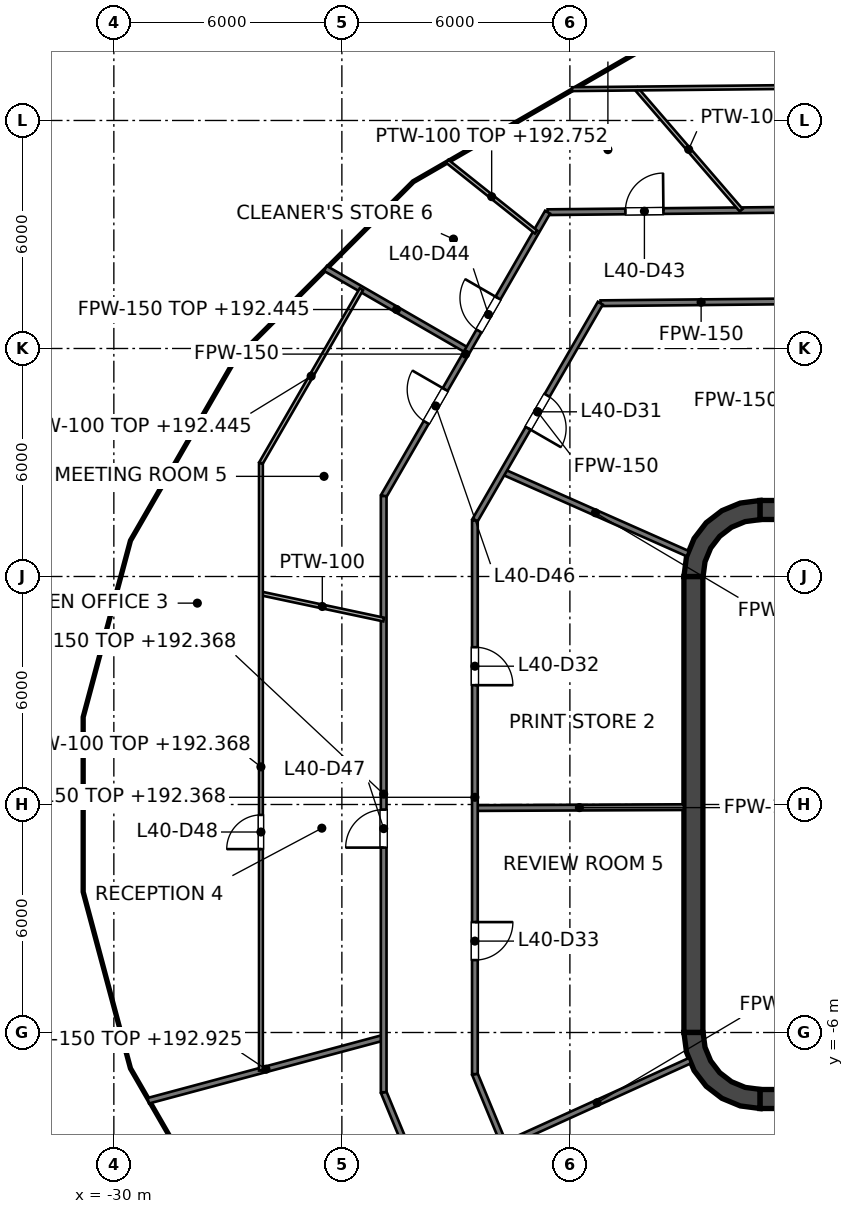
"""IFC4 building model, lengths in metres.
Left out: names, types, materials, properties, quantities, classifications, styles, units other than length and angle.
Written with IfcOpenShell. Run it as: python <this file> out.ifc"""

import sys

from ifc_helpers import new_model, si_unit, direction, frame, frame_2d, origin, place, context, subcontext, project, spatial, polyline, rectangle, outline, extrude, element, fill, save


model = new_model("IFC4")
c1 = context("Model", 3, precision=1e-05, world=origin(), true_north=direction((0.0, 1.0)))
c2 = subcontext(c1, "Body", "Model", "MODEL_VIEW")
j1 = project(units=[si_unit("LENGTHUNIT", "METRE"), si_unit("PLANEANGLEUNIT", "RADIAN")], contexts=[c1])
p1 = place(None, origin())
s1 = spatial("IfcSite", under=j1, at=p1, CompositionType="ELEMENT")
p2 = place(p1, origin())
s2 = spatial("IfcBuilding", under=s1, at=p2, CompositionType="ELEMENT")
p3 = place(p2, frame((0.0, 0.0, 189.6)))
s3 = spatial("IfcBuildingStorey", under=s2, at=p3, CompositionType="ELEMENT", Elevation=189.6)
p4 = place(p3, frame((-13.0, 7.75, 0.0), z_axis=(0.0, 0.0, 1.0), x_axis=(1.0, 0.0, 0.0)))
e1 = element("IfcWall", 1, at=p4, inside=s3, PredefinedType="SHEAR", context=c2, shape_type="SweptSolid", body=[
    extrude(rectangle(XDim=26.0, YDim=0.5, at=frame_2d((13.0, 0.0))), origin(), (0.0, 0.0, 1.0), 4.0),
])
p5 = place(p4, frame((1.7, 0.0, 0.0)))
e2 = element("IfcOpeningElement", 2, at=p5, cuts=e1, PredefinedType="OPENING", context=c2, shape_type="SweptSolid", body=[
    extrude(rectangle(XDim=1.8, YDim=2.1, at=frame_2d((0.9, 1.05))), frame((0.0, 0.25, 0.0), z_axis=(0.0, -1.0, 0.0), x_axis=(1.0, 0.0, 0.0)), (0.0, 0.0, 1.0), 0.5),
])
p6 = place(p4, frame((22.5, 0.0, 0.0)))
e3 = element("IfcOpeningElement", 3, at=p6, cuts=e1, PredefinedType="OPENING", context=c2, shape_type="SweptSolid", body=[
    extrude(rectangle(XDim=1.8, YDim=2.1, at=frame_2d((0.9, 1.05))), frame((0.0, 0.25, 0.0), z_axis=(0.0, -1.0, 0.0), x_axis=(1.0, 0.0, 0.0)), (0.0, 0.0, 1.0), 0.5),
])
p7 = place(p3, frame((-13.0, -7.75, 0.0), z_axis=(0.0, 0.0, 1.0), x_axis=(1.0, 0.0, 0.0)))
e4 = element("IfcWall", 4, at=p7, inside=s3, PredefinedType="SHEAR", context=c2, shape_type="SweptSolid", body=[
    extrude(rectangle(XDim=26.0, YDim=0.5, at=frame_2d((13.0, 0.0))), origin(), (0.0, 0.0, 1.0), 4.0),
])
p8 = place(p7, frame((1.7, 0.0, 0.0)))
e5 = element("IfcOpeningElement", 5, at=p8, cuts=e4, PredefinedType="OPENING", context=c2, shape_type="SweptSolid", body=[
    extrude(rectangle(XDim=1.8, YDim=2.1, at=frame_2d((0.9, 1.05))), frame((0.0, 0.25, 0.0), z_axis=(0.0, -1.0, 0.0), x_axis=(1.0, 0.0, 0.0)), (0.0, 0.0, 1.0), 0.5),
])
p9 = place(p7, frame((22.5, 0.0, 0.0)))
e6 = element("IfcOpeningElement", 6, at=p9, cuts=e4, PredefinedType="OPENING", context=c2, shape_type="SweptSolid", body=[
    extrude(rectangle(XDim=1.8, YDim=2.1, at=frame_2d((0.9, 1.05))), frame((0.0, 0.25, 0.0), z_axis=(0.0, -1.0, 0.0), x_axis=(1.0, 0.0, 0.0)), (0.0, 0.0, 1.0), 0.5),
])
p10 = place(p3, frame((-14.75, -6.0, 0.0), z_axis=(0.0, 0.0, 1.0), x_axis=(0.0, 1.0, 0.0)))
e7 = element("IfcWall", 7, at=p10, inside=s3, PredefinedType="SHEAR", context=c2, shape_type="SweptSolid", body=[
    extrude(rectangle(XDim=12.0, YDim=0.5, at=frame_2d((6.0, 0.0))), origin(), (0.0, 0.0, 1.0), 4.0),
])
p11 = place(p3, origin())
e8 = element("IfcWall", 8, at=p11, inside=s3, PredefinedType="SHEAR", context=c2, shape_type="SweptSolid", body=[
    extrude(outline(polyline([(-15.0, 6.0), (-14.496, 6.0), (-14.445, 6.387), (-14.295, 6.748), (-14.058, 7.058), (-13.748, 7.295), (-13.387, 7.445), (-13.0, 7.496), (-13.0, 8.0), (-13.518, 7.932), (-14.0, 7.732), (-14.414, 7.414), (-14.732, 7.0), (-14.932, 6.518), (-15.0, 6.0)])), origin(), (0.0, 0.0, 1.0), 4.0),
])
e9 = element("IfcWall", 9, at=p11, inside=s3, PredefinedType="SHEAR", context=c2, shape_type="SweptSolid", body=[
    extrude(outline(polyline([(-13.0, -8.0), (-13.0, -7.496), (-13.387, -7.445), (-13.748, -7.295), (-14.058, -7.058), (-14.295, -6.748), (-14.445, -6.387), (-14.496, -6.0), (-15.0, -6.0), (-14.932, -6.518), (-14.732, -7.0), (-14.414, -7.414), (-14.0, -7.732), (-13.518, -7.932), (-13.0, -8.0)])), origin(), (0.0, 0.0, 1.0), 4.0),
])
e10 = element("IfcWall", 10, at=p11, inside=s3, PredefinedType="SOLIDWALL", context=c2, shape_type="SweptSolid", body=[
    extrude(outline(polyline([(-12.0, -5.925), (-12.0, -5.675), (-14.25, -5.675), (-14.25, -3.025), (-12.0, -3.025), (-12.0, -2.775), (-14.25, -2.775), (-14.25, -0.125), (-12.0, -0.125), (-12.0, 0.125), (-14.25, 0.125), (-14.25, 2.775), (-12.0, 2.775), (-12.0, 3.025), (-14.25, 3.025), (-14.25, 5.675), (-12.0, 5.675), (-12.0, 5.925), (-14.25, 5.925), (-14.5, 5.925), (-14.5, 5.675), (-14.5, 3.025), (-14.5, 2.775), (-14.5, 0.125), (-14.5, -0.125), (-14.5, -2.775), (-14.5, -3.025), (-14.5, -5.675), (-14.5, -5.925), (-14.25, -5.925), (-12.0, -5.925)])), origin(), (0.0, 0.0, 1.0), 3.85),
])
p12 = place(p3, frame((-22.9, -7.572, 0.0), z_axis=(0.0, 0.0, 1.0), x_axis=(0.382367581622, -0.924010298928, 0.0)))
e11 = element("IfcWall", 11, at=p12, inside=s3, PredefinedType="PARTITIONING", context=c2, shape_type="SweptSolid", body=[
    extrude(rectangle(XDim=6.374, YDim=0.15, at=frame_2d((3.187, 0.0))), origin(), (0.0, 0.0, 1.0), 2.777),
])
p13 = place(p12, frame((2.6, 0.0, 0.0)))
e12 = element("IfcOpeningElement", 12, at=p13, cuts=e11, PredefinedType="OPENING", context=c2, shape_type="SweptSolid", body=[
    extrude(rectangle(XDim=1.0, YDim=2.1, at=frame_2d((0.5, 1.05))), frame((0.0, 0.075, 0.0), z_axis=(0.0, -1.0, 0.0), x_axis=(1.0, 0.0, 0.0)), (0.0, 0.0, 1.0), 0.15),
])
p14 = place(p3, frame((-20.5, -7.095, 0.0), z_axis=(0.0, 0.0, 1.0), x_axis=(0.382364990163, -0.924011371303, 0.0)))
e13 = element("IfcWall", 13, at=p14, inside=s3, PredefinedType="PARTITIONING", context=c2, shape_type="SweptSolid", body=[
    extrude(rectangle(XDim=4.902, YDim=0.15, at=frame_2d((2.451, 0.0))), origin(), (0.0, 0.0, 1.0), 2.845),
])
p15 = place(p3, frame((-24.433, 14.106, 0.0), z_axis=(0.0, 0.0, 1.0), x_axis=(0.866048255864, -0.499960416948, 0.0)))
e14 = element("IfcWall", 14, at=p15, inside=s3, PredefinedType="PARTITIONING", context=c2, shape_type="SweptSolid", body=[
    extrude(rectangle(XDim=4.322, YDim=0.15, at=frame_2d((2.161, 0.0))), origin(), (0.0, 0.0, 1.0), 2.845),
])
p16 = place(p3, frame((-19.76, 8.755, 0.0), z_axis=(0.0, 0.0, 1.0), x_axis=(0.91424834547, -0.405154245695, 0.0)))
e15 = element("IfcWall", 15, at=p16, inside=s3, PredefinedType="PARTITIONING", context=c2, shape_type="SweptSolid", body=[
    extrude(rectangle(XDim=5.318, YDim=0.15, at=frame_2d((2.659, 0.0))), origin(), (0.0, 0.0, 1.0), 2.845),
])
p17 = place(p3, frame((-20.5, -0.094, 0.0), z_axis=(0.0, 0.0, 1.0), x_axis=(0.999990148138, 0.004438876723, 0.0)))
e16 = element("IfcWall", 16, at=p17, inside=s3, PredefinedType="PARTITIONING", context=c2, shape_type="SweptSolid", body=[
    extrude(rectangle(XDim=5.5, YDim=0.15, at=frame_2d((2.75, 0.0))), origin(), (0.0, 0.0, 1.0), 2.768),
])
p18 = place(p3, frame((-17.194, 13.191, 0.0), z_axis=(0.0, 0.0, 1.0), x_axis=(0.999950853109, 0.009914200296, 0.0)))
e17 = element("IfcWall", 17, at=p18, inside=s3, PredefinedType="PARTITIONING", context=c2, shape_type="SweptSolid", body=[
    extrude(rectangle(XDim=5.294, YDim=0.15, at=frame_2d((2.647, 0.0))), origin(), (0.0, 0.0, 1.0), 2.777),
])
p19 = place(p3, frame((-18.587, 15.586, 0.0), z_axis=(0.0, 0.0, 1.0), x_axis=(0.999951300332, 0.009868989991, 0.0)))
e18 = element("IfcWall", 18, at=p19, inside=s3, PredefinedType="PARTITIONING", context=c2, shape_type="SweptSolid", body=[
    extrude(rectangle(XDim=33.669, YDim=0.15, at=frame_2d((16.834, 0.0))), origin(), (0.0, 0.0, 1.0), 2.768),
])
p20 = place(p19, frame((27.749, 0.0, 0.0)))
e19 = element("IfcOpeningElement", 19, at=p20, cuts=e18, PredefinedType="OPENING", context=c2, shape_type="SweptSolid", body=[
    extrude(rectangle(XDim=1.0, YDim=2.1, at=frame_2d((0.5, 1.05))), frame((0.0, 0.075, 0.0), z_axis=(0.0, -1.0, 0.0), x_axis=(1.0, 0.0, 0.0)), (0.0, 0.0, 1.0), 0.15),
])
p21 = place(p19, frame((21.111, 0.0, 0.0)))
e20 = element("IfcOpeningElement", 20, at=p21, cuts=e18, PredefinedType="OPENING", context=c2, shape_type="SweptSolid", body=[
    extrude(rectangle(XDim=1.0, YDim=2.1, at=frame_2d((0.5, 1.05))), frame((0.0, 0.075, 0.0), z_axis=(0.0, -1.0, 0.0), x_axis=(1.0, 0.0, 0.0)), (0.0, 0.0, 1.0), 0.15),
])
p22 = place(p19, frame((12.139, 0.0, 0.0)))
e21 = element("IfcOpeningElement", 21, at=p22, cuts=e18, PredefinedType="OPENING", context=c2, shape_type="SweptSolid", body=[
    extrude(rectangle(XDim=1.0, YDim=2.1, at=frame_2d((0.5, 1.05))), frame((0.0, 0.075, 0.0), z_axis=(0.0, -1.0, 0.0), x_axis=(1.0, 0.0, 0.0)), (0.0, 0.0, 1.0), 0.15),
])
p23 = place(p19, frame((2.048, 0.0, 0.0)))
e22 = element("IfcOpeningElement", 22, at=p23, cuts=e18, PredefinedType="OPENING", context=c2, shape_type="SweptSolid", body=[
    extrude(rectangle(XDim=1.0, YDim=2.1, at=frame_2d((0.5, 1.05))), frame((0.0, 0.075, 0.0), z_axis=(0.0, -1.0, 0.0), x_axis=(1.0, 0.0, 0.0)), (0.0, 0.0, 1.0), 0.15),
])
p24 = place(p3, frame((-29.094, -7.796, 0.0), z_axis=(0.0, 0.0, 1.0), x_axis=(0.965917630497, 0.258849630277, 0.0)))
e23 = element("IfcWall", 23, at=p24, inside=s3, PredefinedType="PARTITIONING", context=c2, shape_type="SweptSolid", body=[
    extrude(rectangle(XDim=6.413, YDim=0.15, at=frame_2d((3.206, 0.0))), origin(), (0.0, 0.0, 1.0), 3.325),
])
p25 = place(p3, frame((-19.728, -8.958, 0.0), z_axis=(0.0, 0.0, 1.0), x_axis=(0.910629511797, 0.413223779863, 0.0)))
e24 = element("IfcWall", 24, at=p25, inside=s3, PredefinedType="PARTITIONING", context=c2, shape_type="SweptSolid", body=[
    extrude(rectangle(XDim=5.368, YDim=0.15, at=frame_2d((2.684, 0.0))), origin(), (0.0, 0.0, 1.0), 3.7),
])
p26 = place(p3, frame((-20.5, 7.474, 0.0), z_axis=(0.0, 0.0, 1.0), x_axis=(0.499957196903, 0.866050114754, 0.0)))
e25 = element("IfcWall", 25, at=p26, inside=s3, PredefinedType="PARTITIONING", context=c2, shape_type="SweptSolid", body=[
    extrude(rectangle(XDim=6.602, YDim=0.15, at=frame_2d((3.301, 0.0))), origin(), (0.0, 0.0, 1.0), 2.777),
])
p27 = place(p26, frame((2.802, 0.0, 0.0)))
e26 = element("IfcOpeningElement", 26, at=p27, cuts=e25, PredefinedType="OPENING", context=c2, shape_type="SweptSolid", body=[
    extrude(rectangle(XDim=1.0, YDim=2.1, at=frame_2d((0.5, 1.05))), frame((0.0, 0.075, 0.0), z_axis=(0.0, -1.0, 0.0), x_axis=(1.0, 0.0, 0.0)), (0.0, 0.0, 1.0), 0.15),
])
p28 = place(p3, frame((-22.9, 8.117, 0.0), z_axis=(0.0, 0.0, 1.0), x_axis=(0.499950307977, 0.866054091587, 0.0)))
e27 = element("IfcWall", 27, at=p28, inside=s3, PredefinedType="PARTITIONING", context=c2, shape_type="SweptSolid", body=[
    extrude(rectangle(XDim=8.626, YDim=0.15, at=frame_2d((4.313, 0.0))), origin(), (0.0, 0.0, 1.0), 2.777),
])
p29 = place(p28, frame((5.015, 0.0, 0.0)))
e28 = element("IfcOpeningElement", 28, at=p29, cuts=e27, PredefinedType="OPENING", context=c2, shape_type="SweptSolid", body=[
    extrude(rectangle(XDim=1.0, YDim=2.1, at=frame_2d((0.5, 1.05))), frame((0.0, 0.075, 0.0), z_axis=(0.0, -1.0, 0.0), x_axis=(1.0, 0.0, 0.0)), (0.0, 0.0, 1.0), 0.15),
])
p30 = place(p28, frame((2.237, 0.0, 0.0)))
e29 = element("IfcOpeningElement", 29, at=p30, cuts=e27, PredefinedType="OPENING", context=c2, shape_type="SweptSolid", body=[
    extrude(rectangle(XDim=1.0, YDim=2.1, at=frame_2d((0.5, 1.05))), frame((0.0, 0.075, 0.0), z_axis=(0.0, -1.0, 0.0), x_axis=(1.0, 0.0, 0.0)), (0.0, 0.0, 1.0), 0.15),
])
p31 = place(p3, frame((-20.5, -7.095, 0.0), z_axis=(0.0, 0.0, 1.0), x_axis=(0.0, 1.0, 0.0)))
e30 = element("IfcWall", 30, at=p31, inside=s3, PredefinedType="PARTITIONING", context=c2, shape_type="SweptSolid", body=[
    extrude(rectangle(XDim=14.569, YDim=0.15, at=frame_2d((7.285, 0.0))), origin(), (0.0, 0.0, 1.0), 2.768),
])
p32 = place(p31, frame((10.234, 0.0, 0.0)))
e31 = element("IfcOpeningElement", 31, at=p32, cuts=e30, PredefinedType="OPENING", context=c2, shape_type="SweptSolid", body=[
    extrude(rectangle(XDim=1.0, YDim=2.1, at=frame_2d((0.5, 1.05))), frame((0.0, 0.075, 0.0), z_axis=(0.0, -1.0, 0.0), x_axis=(1.0, 0.0, 0.0)), (0.0, 0.0, 1.0), 0.15),
])
p33 = place(p31, frame((3.0, 0.0, 0.0)))
e32 = element("IfcOpeningElement", 32, at=p33, cuts=e30, PredefinedType="OPENING", context=c2, shape_type="SweptSolid", body=[
    extrude(rectangle(XDim=1.0, YDim=2.1, at=frame_2d((0.5, 1.05))), frame((0.0, 0.075, 0.0), z_axis=(0.0, -1.0, 0.0), x_axis=(1.0, 0.0, 0.0)), (0.0, 0.0, 1.0), 0.15),
])
p34 = place(p3, frame((-22.9, -7.572, 0.0), z_axis=(0.0, 0.0, 1.0), x_axis=(0.0, 1.0, 0.0)))
e33 = element("IfcWall", 33, at=p34, inside=s3, PredefinedType="PARTITIONING", context=c2, shape_type="SweptSolid", body=[
    extrude(rectangle(XDim=15.689, YDim=0.15, at=frame_2d((7.844, 0.0))), origin(), (0.0, 0.0, 1.0), 2.768),
])
p35 = place(p34, frame((6.438, 0.0, 0.0)))
e34 = element("IfcOpeningElement", 34, at=p35, cuts=e33, PredefinedType="OPENING", context=c2, shape_type="SweptSolid", body=[
    extrude(rectangle(XDim=1.0, YDim=2.1, at=frame_2d((0.5, 1.05))), frame((0.0, 0.075, 0.0), z_axis=(0.0, -1.0, 0.0), x_axis=(1.0, 0.0, 0.0)), (0.0, 0.0, 1.0), 0.15),
])
p36 = place(p3, frame((-16.257, 18.841, 0.0), z_axis=(0.0, 0.0, 1.0), x_axis=(0.653325359449, -0.757077258079, 0.0)))
e35 = element("IfcWall", 35, at=p36, inside=s3, PredefinedType="PARTITIONING", context=c2, shape_type="SweptSolid", body=[
    extrude(rectangle(XDim=4.231, YDim=0.1, at=frame_2d((2.115, 0.0))), origin(), (0.0, 0.0, 1.0), 3.7),
])
p37 = place(p3, frame((-21.228, 16.928, 0.0), z_axis=(0.0, 0.0, 1.0), x_axis=(0.781894831851, -0.623410355966, 0.0)))
e36 = element("IfcWall", 36, at=p37, inside=s3, PredefinedType="PARTITIONING", context=c2, shape_type="SweptSolid", body=[
    extrude(rectangle(XDim=2.992, YDim=0.1, at=frame_2d((1.496, 0.0))), origin(), (0.0, 0.0, 1.0), 3.152),
])
p38 = place(p3, frame((-26.13, 5.554, 0.0), z_axis=(0.0, 0.0, 1.0), x_axis=(0.978119374933, -0.208044438478, 0.0)))
e37 = element("IfcWall", 37, at=p38, inside=s3, PredefinedType="PARTITIONING", context=c2, shape_type="SweptSolid", body=[
    extrude(rectangle(XDim=3.302, YDim=0.1, at=frame_2d((1.651, 0.0))), origin(), (0.0, 0.0, 1.0), 3.7),
])
p39 = place(p3, frame((-17.945, 18.824, 0.0), z_axis=(0.0, 0.0, 1.0), x_axis=(0.999950833273, 0.009916200716, 0.0)))
e38 = element("IfcWall", 38, at=p39, inside=s3, PredefinedType="PARTITIONING", context=c2, shape_type="SweptSolid", body=[
    extrude(rectangle(XDim=33.878, YDim=0.1, at=frame_2d((16.939, 0.0))), origin(), (0.0, 0.0, 1.0), 2.768),
])
p40 = place(p39, frame((27.964, 0.0, 0.0)))
e39 = element("IfcOpeningElement", 39, at=p40, cuts=e38, PredefinedType="OPENING", context=c2, shape_type="SweptSolid", body=[
    extrude(rectangle(XDim=0.9, YDim=2.1, at=frame_2d((0.45, 1.05))), frame((0.0, 0.05, 0.0), z_axis=(0.0, -1.0, 0.0), x_axis=(1.0, 0.0, 0.0)), (0.0, 0.0, 1.0), 0.1),
])
p41 = place(p39, frame((10.39, 0.0, 0.0)))
e40 = element("IfcOpeningElement", 40, at=p41, cuts=e38, PredefinedType="OPENING", context=c2, shape_type="SweptSolid", body=[
    extrude(rectangle(XDim=0.9, YDim=2.1, at=frame_2d((0.45, 1.05))), frame((0.0, 0.05, 0.0), z_axis=(0.0, -1.0, 0.0), x_axis=(1.0, 0.0, 0.0)), (0.0, 0.0, 1.0), 0.1),
])
p42 = place(p3, frame((-26.13, 8.983, 0.0), z_axis=(0.0, 0.0, 1.0), x_axis=(0.500063643593, 0.865988656021, 0.0)))
e41 = element("IfcWall", 41, at=p42, inside=s3, PredefinedType="PARTITIONING", context=c2, shape_type="SweptSolid", body=[
    extrude(rectangle(XDim=5.285, YDim=0.1, at=frame_2d((2.643, 0.0))), origin(), (0.0, 0.0, 1.0), 2.845),
])
p43 = place(p3, frame((-26.13, -7.002, 0.0), z_axis=(0.0, 0.0, 1.0), x_axis=(0.0, 1.0, 0.0)))
e42 = element("IfcWall", 42, at=p43, inside=s3, PredefinedType="PARTITIONING", context=c2, shape_type="SweptSolid", body=[
    extrude(rectangle(XDim=15.985, YDim=0.1, at=frame_2d((7.992, 0.0))), origin(), (0.0, 0.0, 1.0), 2.768),
])
p44 = place(p43, frame((5.828, 0.0, 0.0)))
e43 = element("IfcOpeningElement", 43, at=p44, cuts=e42, PredefinedType="OPENING", context=c2, shape_type="SweptSolid", body=[
    extrude(rectangle(XDim=0.9, YDim=2.1, at=frame_2d((0.45, 1.05))), frame((0.0, 0.05, 0.0), z_axis=(0.0, -1.0, 0.0), x_axis=(1.0, 0.0, 0.0)), (0.0, 0.0, 1.0), 0.1),
])
p45 = place(p27, origin())
e44 = element("IfcDoor", 44, at=p45, inside=s3, OperationType="SINGLE_SWING_LEFT", PredefinedType="DOOR", context=c2, shape_type="SweptSolid", body=[
    extrude(rectangle(XDim=1.0, YDim=2.1, at=frame_2d((0.5, 1.05))), frame((0.0, 0.025, 0.0), z_axis=(0.0, -1.0, 0.0), x_axis=(1.0, 0.0, 0.0)), (0.0, 0.0, 1.0), 0.05),
])
fill(e26, e44)
p46 = place(p32, origin())
e45 = element("IfcDoor", 45, at=p46, inside=s3, OperationType="SINGLE_SWING_LEFT", PredefinedType="DOOR", context=c2, shape_type="SweptSolid", body=[
    extrude(rectangle(XDim=1.0, YDim=2.1, at=frame_2d((0.5, 1.05))), frame((0.0, 0.025, 0.0), z_axis=(0.0, -1.0, 0.0), x_axis=(1.0, 0.0, 0.0)), (0.0, 0.0, 1.0), 0.05),
])
fill(e31, e45)
p47 = place(p33, origin())
e46 = element("IfcDoor", 46, at=p47, inside=s3, OperationType="SINGLE_SWING_RIGHT", PredefinedType="DOOR", context=c2, shape_type="SweptSolid", body=[
    extrude(rectangle(XDim=1.0, YDim=2.1, at=frame_2d((0.5, 1.05))), frame((0.0, 0.025, 0.0), z_axis=(0.0, -1.0, 0.0), x_axis=(1.0, 0.0, 0.0)), (0.0, 0.0, 1.0), 0.05),
])
fill(e32, e46)
p48 = place(p23, origin())
e47 = element("IfcDoor", 47, at=p48, inside=s3, OperationType="SINGLE_SWING_RIGHT", PredefinedType="DOOR", context=c2, shape_type="SweptSolid", body=[
    extrude(rectangle(XDim=1.0, YDim=2.1, at=frame_2d((0.5, 1.05))), frame((0.0, 0.025, 0.0), z_axis=(0.0, -1.0, 0.0), x_axis=(1.0, 0.0, 0.0)), (0.0, 0.0, 1.0), 0.05),
])
fill(e22, e47)
p49 = place(p29, origin())
e48 = element("IfcDoor", 48, at=p49, inside=s3, OperationType="SINGLE_SWING_RIGHT", PredefinedType="DOOR", context=c2, shape_type="SweptSolid", body=[
    extrude(rectangle(XDim=1.0, YDim=2.1, at=frame_2d((0.5, 1.05))), frame((0.0, 0.025, 0.0), z_axis=(0.0, -1.0, 0.0), x_axis=(1.0, 0.0, 0.0)), (0.0, 0.0, 1.0), 0.05),
])
fill(e28, e48)
p50 = place(p30, origin())
e49 = element("IfcDoor", 49, at=p50, inside=s3, OperationType="SINGLE_SWING_RIGHT", PredefinedType="DOOR", context=c2, shape_type="SweptSolid", body=[
    extrude(rectangle(XDim=1.0, YDim=2.1, at=frame_2d((0.5, 1.05))), frame((0.0, 0.025, 0.0), z_axis=(0.0, -1.0, 0.0), x_axis=(1.0, 0.0, 0.0)), (0.0, 0.0, 1.0), 0.05),
])
fill(e29, e49)
p51 = place(p35, origin())
e50 = element("IfcDoor", 50, at=p51, inside=s3, OperationType="SINGLE_SWING_LEFT", PredefinedType="DOOR", context=c2, shape_type="SweptSolid", body=[
    extrude(rectangle(XDim=1.0, YDim=2.1, at=frame_2d((0.5, 1.05))), frame((0.0, 0.025, 0.0), z_axis=(0.0, -1.0, 0.0), x_axis=(1.0, 0.0, 0.0)), (0.0, 0.0, 1.0), 0.05),
])
fill(e34, e50)
p52 = place(p44, origin())
e51 = element("IfcDoor", 51, at=p52, inside=s3, OperationType="SINGLE_SWING_LEFT", PredefinedType="DOOR", context=c2, shape_type="SweptSolid", body=[
    extrude(rectangle(XDim=0.9, YDim=2.1, at=frame_2d((0.45, 1.05))), frame((0.0, 0.025, 0.0), z_axis=(0.0, -1.0, 0.0), x_axis=(1.0, 0.0, 0.0)), (0.0, 0.0, 1.0), 0.05),
])
fill(e43, e51)
save(model, sys.argv[1])
